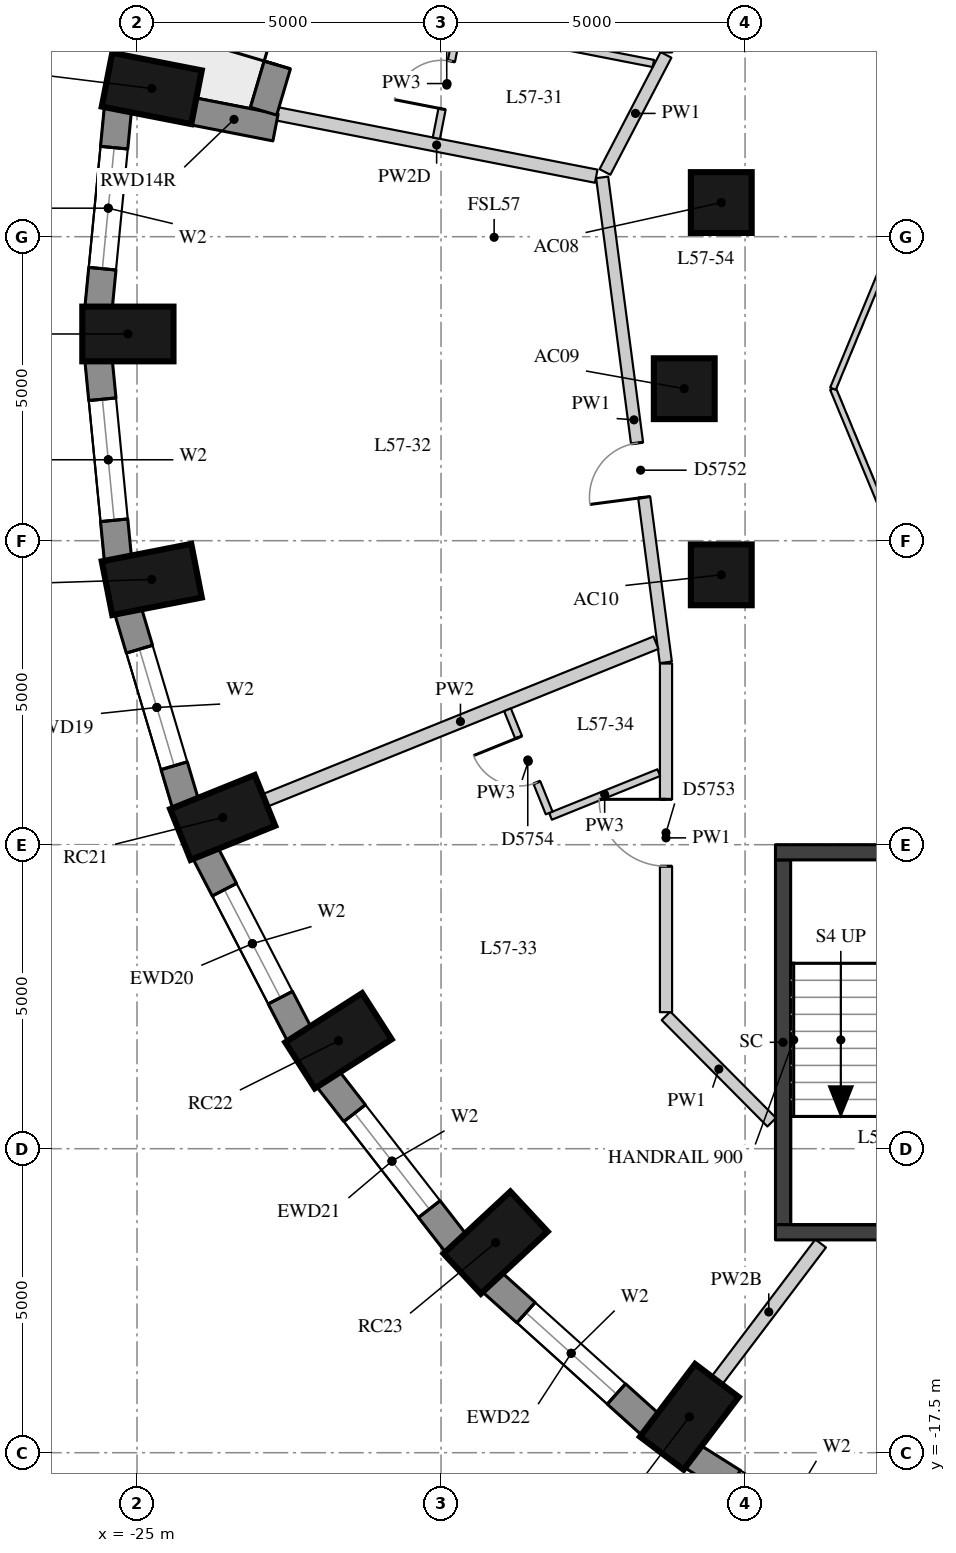
"""IFC4 building model, lengths in metres.
Left out: names, types, materials, properties, quantities, classifications, styles, units other than length and angle.
Written with IfcOpenShell. Run it as: python <this file> out.ifc"""

import sys

from ifc_helpers import new_model, si_unit, direction, frame, frame_2d, origin, origin_2d, place, context, subcontext, project, spatial, rectangle, extrude, element, fill, save


model = new_model("IFC4")
c1 = context("Model", 3, precision=1e-05, world=origin(), true_north=direction((0.0, 1.0)))
c2 = subcontext(c1, "Body", "Model", "MODEL_VIEW")
j1 = project(units=[si_unit("LENGTHUNIT", "METRE"), si_unit("PLANEANGLEUNIT", "RADIAN")], contexts=[c1])
p1 = place(None, origin())
s1 = spatial("IfcSite", under=j1, at=p1, CompositionType="ELEMENT")
p2 = place(p1, origin())
s2 = spatial("IfcBuilding", under=s1, at=p2, CompositionType="ELEMENT")
p3 = place(p2, frame((0.0, 0.0, 202.4)))
s3 = spatial("IfcBuildingStorey", under=s2, at=p3, CompositionType="ELEMENT", Elevation=202.4)
for number, where, z_axis, x_axis in (
    (1, (-24.757, 4.937, 0.0), (0.0, 0.0, 1.0), (-0.981, 0.192, 0.0)),
    (2, (-25.15, 0.9, 0.0), (0.0, 0.0, 1.0), (-1.0, 0.0, 0.0)),
    (3, (-24.757, -3.137, 0.0), (0.0, 0.0, 1.0), (-0.981, -0.192, 0.0)),
    (4, (-23.591, -7.052, 0.0), (0.0, 0.0, 1.0), (-0.927, -0.374, 0.0)),
    (5, (-21.687, -10.725, 0.0), (0.0, 0.0, 1.0), (-0.842, -0.539, 0.0)),
    (6, (-19.102, -14.045, 0.0), (0.0, 0.0, 1.0), (-0.732, -0.681, 0.0)),
    (7, (-15.916, -16.911, 0.0), (0.0, 0.0, 1.0), (-0.604, -0.797, 0.0)),
):
    element("IfcColumn", number, at=place(p3, frame(where, z_axis=z_axis, x_axis=x_axis)), inside=s3, PredefinedType="COLUMN", context=c2, shape_type="SweptSolid", body=[
        extrude(rectangle(XDim=1.5, YDim=0.9, at=origin_2d()), origin(), (0.0, 0.0, 1.0), 3.3),
    ])
for number, where, z_axis, x_axis in (
    (8, (-15.391, 3.062, 0.0), (0.0, 0.0, 1.0), (1.0, 0.0, 0.0)),
    (9, (-16.0, 0.0, 0.0), (0.0, 0.0, 1.0), (1.0, 0.0, 0.0)),
    (10, (-15.391, -3.062, 0.0), (0.0, 0.0, 1.0), (1.0, 0.0, 0.0)),
):
    element("IfcColumn", number, at=place(p3, frame(where, z_axis=z_axis, x_axis=x_axis)), inside=s3, PredefinedType="COLUMN", context=c2, shape_type="SweptSolid", body=[
        extrude(rectangle(XDim=1.0, YDim=1.0, at=origin_2d()), origin(), (0.0, 0.0, 1.0), 3.3),
    ])
p4 = place(p3, frame((-25.313, 4.608, 0.0), z_axis=(0.0, 0.0, 1.0), x_axis=(-0.096824116835, -0.995301507283, 0.0)))
e11 = element("IfcWall", 11, at=p4, inside=s3, PredefinedType="SOLIDWALL", context=c2, shape_type="SweptSolid", body=[
    extrude(rectangle(XDim=3.293, YDim=0.45, at=frame_2d((1.646, 0.0))), origin(), (0.0, 0.0, 1.0), 3.02),
])
p5 = place(p4, frame((0.646, 0.0, 0.4)))
e12 = element("IfcOpeningElement", 12, at=p5, cuts=e11, PredefinedType="OPENING", context=c2, shape_type="SweptSolid", body=[
    extrude(rectangle(XDim=2.0, YDim=1.75, at=frame_2d((1.0, 0.875))), frame((0.0, 0.235, 0.0), z_axis=(0.0, -1.0, 0.0), x_axis=(1.0, 0.0, 0.0)), (0.0, 0.0, 1.0), 0.47),
])
p6 = place(p3, frame((-25.632, 0.47, 0.0), z_axis=(0.0, 0.0, 1.0), x_axis=(0.096816972749, -0.995302202242, 0.0)))
e13 = element("IfcWall", 13, at=p6, inside=s3, PredefinedType="SOLIDWALL", context=c2, shape_type="SweptSolid", body=[
    extrude(rectangle(XDim=3.293, YDim=0.45, at=frame_2d((1.646, 0.0))), origin(), (0.0, 0.0, 1.0), 3.02),
])
p7 = place(p6, frame((0.646, 0.0, 0.4)))
e14 = element("IfcOpeningElement", 14, at=p7, cuts=e13, PredefinedType="OPENING", context=c2, shape_type="SweptSolid", body=[
    extrude(rectangle(XDim=2.0, YDim=1.75, at=frame_2d((1.0, 0.875))), frame((0.0, 0.235, 0.0), z_axis=(0.0, -1.0, 0.0), x_axis=(1.0, 0.0, 0.0)), (0.0, 0.0, 1.0), 0.47),
])
p8 = place(p3, frame((-25.148, -3.652, 0.0), z_axis=(0.0, 0.0, 1.0), x_axis=(0.285444972963, -0.958395099847, 0.0)))
e15 = element("IfcWall", 15, at=p8, inside=s3, PredefinedType="SOLIDWALL", context=c2, shape_type="SweptSolid", body=[
    extrude(rectangle(XDim=3.32, YDim=0.45, at=frame_2d((1.66, 0.0))), origin(), (0.0, 0.0, 1.0), 3.02),
])
p9 = place(p8, frame((0.66, 0.0, 0.4)))
e16 = element("IfcOpeningElement", 16, at=p9, cuts=e15, PredefinedType="OPENING", context=c2, shape_type="SweptSolid", body=[
    extrude(rectangle(XDim=2.0, YDim=1.75, at=frame_2d((1.0, 0.875))), frame((0.0, 0.235, 0.0), z_axis=(0.0, -1.0, 0.0), x_axis=(1.0, 0.0, 0.0)), (0.0, 0.0, 1.0), 0.47),
])
p10 = place(p3, frame((-23.878, -7.632, 0.0), z_axis=(0.0, 0.0, 1.0), x_axis=(0.460232593174, -0.887798378113, 0.0)))
e17 = element("IfcWall", 17, at=p10, inside=s3, PredefinedType="SOLIDWALL", context=c2, shape_type="SweptSolid", body=[
    extrude(rectangle(XDim=3.371, YDim=0.45, at=frame_2d((1.685, 0.0))), origin(), (0.0, 0.0, 1.0), 3.02),
])
p11 = place(p10, frame((0.685, 0.0, 0.4)))
e18 = element("IfcOpeningElement", 18, at=p11, cuts=e17, PredefinedType="OPENING", context=c2, shape_type="SweptSolid", body=[
    extrude(rectangle(XDim=2.0, YDim=1.75, at=frame_2d((1.0, 0.875))), frame((0.0, 0.235, 0.0), z_axis=(0.0, -1.0, 0.0), x_axis=(1.0, 0.0, 0.0)), (0.0, 0.0, 1.0), 0.47),
])
p12 = place(p3, frame((-21.863, -11.348, 0.0), z_axis=(0.0, 0.0, 1.0), x_axis=(0.614255239631, -0.789107407509, 0.0)))
e19 = element("IfcWall", 19, at=p12, inside=s3, PredefinedType="SOLIDWALL", context=c2, shape_type="SweptSolid", body=[
    extrude(rectangle(XDim=3.438, YDim=0.45, at=frame_2d((1.719, 0.0))), origin(), (0.0, 0.0, 1.0), 3.02),
])
p13 = place(p12, frame((0.719, 0.0, 0.4)))
e20 = element("IfcOpeningElement", 20, at=p13, cuts=e19, PredefinedType="OPENING", context=c2, shape_type="SweptSolid", body=[
    extrude(rectangle(XDim=2.0, YDim=1.75, at=frame_2d((1.0, 0.875))), frame((0.0, 0.235, 0.0), z_axis=(0.0, -1.0, 0.0), x_axis=(1.0, 0.0, 0.0)), (0.0, 0.0, 1.0), 0.47),
])
p14 = place(p3, frame((-19.165, -14.69, 0.0), z_axis=(0.0, 0.0, 1.0), x_axis=(0.743442727602, -0.668799604348, 0.0)))
e21 = element("IfcWall", 21, at=p14, inside=s3, PredefinedType="SOLIDWALL", context=c2, shape_type="SweptSolid", body=[
    extrude(rectangle(XDim=3.513, YDim=0.45, at=frame_2d((1.756, 0.0))), origin(), (0.0, 0.0, 1.0), 3.02),
])
p15 = place(p14, frame((0.756, 0.0, 0.4)))
e22 = element("IfcOpeningElement", 22, at=p15, cuts=e21, PredefinedType="OPENING", context=c2, shape_type="SweptSolid", body=[
    extrude(rectangle(XDim=2.0, YDim=1.75, at=frame_2d((1.0, 0.875))), frame((0.0, 0.235, 0.0), z_axis=(0.0, -1.0, 0.0), x_axis=(1.0, 0.0, 0.0)), (0.0, 0.0, 1.0), 0.47),
])
p16 = place(p3, frame((-15.867, -17.559, 0.0), z_axis=(0.0, 0.0, 1.0), x_axis=(0.84616917791, -0.532914366813, 0.0)))
e23 = element("IfcWall", 23, at=p16, inside=s3, PredefinedType="SOLIDWALL", context=c2, shape_type="SweptSolid", body=[
    extrude(rectangle(XDim=3.587, YDim=0.45, at=frame_2d((1.793, 0.0))), origin(), (0.0, 0.0, 1.0), 3.02),
])
p17 = place(p16, frame((0.793, 0.0, 0.4)))
e24 = element("IfcOpeningElement", 24, at=p17, cuts=e23, PredefinedType="OPENING", context=c2, shape_type="SweptSolid", body=[
    extrude(rectangle(XDim=2.0, YDim=1.75, at=frame_2d((1.0, 0.875))), frame((0.0, 0.235, 0.0), z_axis=(0.0, -1.0, 0.0), x_axis=(1.0, 0.0, 0.0)), (0.0, 0.0, 1.0), 0.47),
])
p18 = place(p3, frame((-24.087, 4.563, 0.0), z_axis=(0.0, 0.0, 1.0), x_axis=(0.98143579878, -0.191790961394, 0.0)))
e25 = element("IfcWall", 25, at=p18, inside=s3, PredefinedType="SOLIDWALL", context=c2, shape_type="SweptSolid", body=[
    extrude(rectangle(XDim=1.39, YDim=0.45, at=frame_2d((0.695, 0.0))), origin(), (0.0, 0.0, 1.0), 2.47),
])
p19 = place(p3, frame((-21.854, 8.146, 0.0), z_axis=(0.0, 0.0, 1.0), x_axis=(-0.284757753004, -0.958599510799, 0.0)))
e26 = element("IfcWall", 26, at=p19, inside=s3, PredefinedType="SOLIDWALL", context=c2, shape_type="SweptSolid", body=[
    extrude(rectangle(XDim=3.737, YDim=0.45, at=frame_2d((1.869, 0.0))), origin(), (0.0, 0.0, 1.0), 3.02),
])
p20 = place(p19, frame((0.794, 0.0, 0.4)))
e27 = element("IfcOpeningElement", 27, at=p20, cuts=e26, PredefinedType="OPENING", context=c2, shape_type="SweptSolid", body=[
    extrude(rectangle(XDim=1.0, YDim=1.75, at=frame_2d((0.5, 0.875))), frame((0.0, 0.235, 0.0), z_axis=(0.0, -1.0, 0.0), x_axis=(1.0, 0.0, 0.0)), (0.0, 0.0, 1.0), 0.47),
])
p21 = place(p19, frame((1.944, 0.0, 0.0)))
e28 = element("IfcOpeningElement", 28, at=p21, cuts=e26, PredefinedType="OPENING", context=c2, shape_type="SweptSolid", body=[
    extrude(rectangle(XDim=1.0, YDim=2.15, at=frame_2d((0.5, 1.075))), frame((0.0, 0.235, 0.0), z_axis=(0.0, -1.0, 0.0), x_axis=(1.0, 0.0, 0.0)), (0.0, 0.0, 1.0), 0.47),
])
p22 = place(p3, frame((-14.375, -13.75, -0.28), z_axis=(0.0, 0.0, 1.0), x_axis=(0.0, 1.0, 0.0)))
e29 = element("IfcWall", 29, at=p22, inside=s3, PredefinedType="SHEAR", context=c2, shape_type="SweptSolid", body=[
    extrude(rectangle(XDim=6.0, YDim=0.25, at=frame_2d((3.0, 0.0))), origin(), (0.0, 0.0, 1.0), 3.3),
])
for number, where, z_axis, x_axis in (
    (30, (-14.5, -7.625, -0.28), (0.0, 0.0, 1.0), (1.0, 0.0, 0.0)),
    (31, (-14.5, -13.875, -0.28), (0.0, 0.0, 1.0), (1.0, 0.0, 0.0)),
):
    element("IfcWall", number, at=place(p3, frame(where, z_axis=z_axis, x_axis=x_axis)), inside=s3, PredefinedType="SHEAR", context=c2, shape_type="SweptSolid", body=[
        extrude(rectangle(XDim=5.2, YDim=0.25, at=frame_2d((2.6, 0.0))), origin(), (0.0, 0.0, 1.0), 3.3),
    ])
p23 = place(p3, frame((-14.562, -12.064, 0.0), z_axis=(0.0, 0.0, 1.0), x_axis=(-0.704826289083, 0.709379942074, 0.0)))
e32 = element("IfcWall", 32, at=p23, inside=s3, PredefinedType="PARTITIONING", context=c2, shape_type="SweptSolid", body=[
    extrude(rectangle(XDim=2.466, YDim=0.2, at=frame_2d((1.233, 0.0))), origin(), (0.0, 0.0, 1.0), 3.02),
])
p24 = place(p3, frame((-16.3, -10.255, 0.0), z_axis=(0.0, 0.0, 1.0), x_axis=(0.0, 1.0, 0.0)))
e33 = element("IfcWall", 33, at=p24, inside=s3, PredefinedType="PARTITIONING", context=c2, shape_type="SweptSolid", body=[
    extrude(rectangle(XDim=5.734, YDim=0.2, at=frame_2d((2.867, 0.0))), origin(), (0.0, 0.0, 1.0), 3.02),
])
p25 = place(p24, frame((2.401, 0.0, 0.0)))
e34 = element("IfcOpeningElement", 34, at=p25, cuts=e33, PredefinedType="OPENING", context=c2, shape_type="SweptSolid", body=[
    extrude(rectangle(XDim=1.1, YDim=2.1, at=frame_2d((0.55, 1.05))), frame((0.0, 0.11, 0.0), z_axis=(0.0, -1.0, 0.0), x_axis=(1.0, 0.0, 0.0)), (0.0, 0.0, 1.0), 0.22),
])
p26 = place(p3, frame((-16.303, -4.501, 0.0), z_axis=(0.0, 0.0, 1.0), x_axis=(-0.130191522351, 0.991488864036, 0.0)))
e35 = element("IfcWall", 35, at=p26, inside=s3, PredefinedType="PARTITIONING", context=c2, shape_type="SweptSolid", body=[
    extrude(rectangle(XDim=8.045, YDim=0.2, at=frame_2d((4.022, 0.0))), origin(), (0.0, 0.0, 1.0), 3.02),
])
p27 = place(p26, frame((2.738, 0.0, 0.0)))
e36 = element("IfcOpeningElement", 36, at=p27, cuts=e35, PredefinedType="OPENING", context=c2, shape_type="SweptSolid", body=[
    extrude(rectangle(XDim=0.9, YDim=2.1, at=frame_2d((0.45, 1.05))), frame((0.0, 0.11, 0.0), z_axis=(0.0, -1.0, 0.0), x_axis=(1.0, 0.0, 0.0)), (0.0, 0.0, 1.0), 0.22),
])
p28 = place(p3, frame((-17.304, 3.565, 0.0), z_axis=(0.0, 0.0, 1.0), x_axis=(0.46212415324, 0.886815238363, 0.0)))
e37 = element("IfcWall", 37, at=p28, inside=s3, PredefinedType="PARTITIONING", context=c2, shape_type="SweptSolid", body=[
    extrude(rectangle(XDim=2.172, YDim=0.2, at=frame_2d((1.086, 0.0))), origin(), (0.0, 0.0, 1.0), 3.02),
])
p29 = place(p3, frame((-16.3, 5.531, 0.0), z_axis=(0.0, 0.0, 1.0), x_axis=(0.0, 1.0, 0.0)))
e38 = element("IfcWall", 38, at=p29, inside=s3, PredefinedType="PARTITIONING", context=c2, shape_type="SweptSolid", body=[
    extrude(rectangle(XDim=2.409, YDim=0.2, at=frame_2d((1.205, 0.0))), origin(), (0.0, 0.0, 1.0), 3.02),
])
p30 = place(p29, frame((0.14, 0.0, 0.0)))
e39 = element("IfcOpeningElement", 39, at=p30, cuts=e38, PredefinedType="OPENING", context=c2, shape_type="SweptSolid", body=[
    extrude(rectangle(XDim=1.1, YDim=2.1, at=frame_2d((0.55, 1.05))), frame((0.0, 0.11, 0.0), z_axis=(0.0, -1.0, 0.0), x_axis=(1.0, 0.0, 0.0)), (0.0, 0.0, 1.0), 0.22),
])
p31 = place(p3, frame((-22.697, 4.521, 0.0), z_axis=(0.0, 0.0, 1.0), x_axis=(0.981448712972, -0.19172486486, 0.0)))
e40 = element("IfcWall", 40, at=p31, inside=s3, PredefinedType="PARTITIONING", context=c2, shape_type="SweptSolid", body=[
    extrude(rectangle(XDim=5.348, YDim=0.22, at=frame_2d((2.674, 0.0))), origin(), (0.0, 0.0, 1.0), 2.47),
])
p32 = place(p3, frame((-22.896, -6.771, 0.0), z_axis=(0.0, 0.0, 1.0), x_axis=(0.927377440276, 0.374127095073, 0.0)))
e41 = element("IfcWall", 41, at=p32, inside=s3, PredefinedType="PARTITIONING", context=c2, shape_type="SweptSolid", body=[
    extrude(rectangle(XDim=6.933, YDim=0.22, at=frame_2d((3.467, 0.0))), origin(), (0.0, 0.0, 1.0), 3.02),
])
p33 = place(p3, frame((-15.463, -16.312, 0.0), z_axis=(0.0, 0.0, 1.0), x_axis=(0.603613294085, 0.797277236101, 0.0)))
e42 = element("IfcWall", 42, at=p33, inside=s3, PredefinedType="PARTITIONING", context=c2, shape_type="SweptSolid", body=[
    extrude(rectangle(XDim=2.828, YDim=0.22, at=frame_2d((1.414, 0.0))), origin(), (0.0, 0.0, 1.0), 2.57),
])
p34 = place(p3, frame((-16.508, 5.349, 0.0), z_axis=(0.0, 0.0, 1.0), x_axis=(-0.981441910277, 0.191759684898, 0.0)))
e43 = element("IfcWall", 43, at=p34, inside=s3, PredefinedType="PARTITIONING", context=c2, shape_type="SweptSolid", body=[
    extrude(rectangle(XDim=3.267, YDim=0.12, at=frame_2d((1.633, 0.0))), origin(), (0.0, 0.0, 1.0), 3.02),
])
p35 = place(p3, frame((-16.419, -6.315, 0.0), z_axis=(0.0, 0.0, 1.0), x_axis=(-0.927358946461, -0.374172933841, 0.0)))
e44 = element("IfcWall", 44, at=p35, inside=s3, PredefinedType="PARTITIONING", context=c2, shape_type="SweptSolid", body=[
    extrude(rectangle(XDim=1.92, YDim=0.12, at=frame_2d((0.96, 0.0))), origin(), (0.0, 0.0, 1.0), 3.02),
])
p36 = place(p3, frame((-19.726, 5.917, 0.0), z_axis=(0.0, 0.0, 1.0), x_axis=(-0.191830051998, -0.981428158935, 0.0)))
e45 = element("IfcWall", 45, at=p36, inside=s3, PredefinedType="PARTITIONING", context=c2, shape_type="SweptSolid", body=[
    extrude(rectangle(XDim=1.83, YDim=0.12, at=frame_2d((0.915, 0.0))), origin(), (0.0, 0.0, 1.0), 3.02),
])
p37 = place(p36, frame((0.54, 0.0, 0.0)))
e46 = element("IfcOpeningElement", 46, at=p37, cuts=e45, PredefinedType="OPENING", context=c2, shape_type="SweptSolid", body=[
    extrude(rectangle(XDim=0.8, YDim=2.1, at=frame_2d((0.4, 1.05))), frame((0.0, 0.07, 0.0), z_axis=(0.0, -1.0, 0.0), x_axis=(1.0, 0.0, 0.0)), (0.0, 0.0, 1.0), 0.14),
])
p38 = place(p3, frame((-18.222, -6.978, 0.0), z_axis=(0.0, 0.0, 1.0), x_axis=(-0.374218187905, 0.927340685963, 0.0)))
e47 = element("IfcWall", 47, at=p38, inside=s3, PredefinedType="PARTITIONING", context=c2, shape_type="SweptSolid", body=[
    extrude(rectangle(XDim=1.83, YDim=0.12, at=frame_2d((0.915, 0.0))), origin(), (0.0, 0.0, 1.0), 3.02),
])
p39 = place(p38, frame((0.54, 0.0, 0.0)))
e48 = element("IfcOpeningElement", 48, at=p39, cuts=e47, PredefinedType="OPENING", context=c2, shape_type="SweptSolid", body=[
    extrude(rectangle(XDim=0.8, YDim=2.1, at=frame_2d((0.4, 1.05))), frame((0.0, 0.07, 0.0), z_axis=(0.0, -1.0, 0.0), x_axis=(1.0, 0.0, 0.0)), (0.0, 0.0, 1.0), 0.14),
])
for number, where, z_axis, x_axis in (
    (49, (-11.927, -3.927, 0.0), (0.0, 0.0, 1.0), (-0.383, 0.924, 0.0)),
    (50, (-13.554, 0.0, 0.0), (0.0, 0.0, 1.0), (0.383, 0.924, 0.0)),
):
    element("IfcWall", number, at=place(p3, frame(where, z_axis=z_axis, x_axis=x_axis)), inside=s3, PredefinedType="PARTITIONING", context=c2, shape_type="SweptSolid", body=[
        extrude(rectangle(XDim=4.251, YDim=0.1, at=frame_2d((2.125, 0.0))), origin(), (0.0, 0.0, 1.0), 3.02),
    ])
p40 = place(p5, origin())
e51 = element("IfcWindow", 51, at=p40, inside=s3, PartitioningType="SINGLE_PANEL", PredefinedType="WINDOW", context=c2, shape_type="SweptSolid", body=[
    extrude(rectangle(XDim=2.0, YDim=1.75, at=frame_2d((1.0, 0.875))), frame((0.0, 0.035, 0.0), z_axis=(0.0, -1.0, 0.0), x_axis=(1.0, 0.0, 0.0)), (0.0, 0.0, 1.0), 0.06),
])
fill(e12, e51)
p41 = place(p7, origin())
e52 = element("IfcWindow", 52, at=p41, inside=s3, PartitioningType="SINGLE_PANEL", PredefinedType="WINDOW", context=c2, shape_type="SweptSolid", body=[
    extrude(rectangle(XDim=2.0, YDim=1.75, at=frame_2d((1.0, 0.875))), frame((0.0, 0.035, 0.0), z_axis=(0.0, -1.0, 0.0), x_axis=(1.0, 0.0, 0.0)), (0.0, 0.0, 1.0), 0.06),
])
fill(e14, e52)
p42 = place(p9, origin())
e53 = element("IfcWindow", 53, at=p42, inside=s3, PartitioningType="SINGLE_PANEL", PredefinedType="WINDOW", context=c2, shape_type="SweptSolid", body=[
    extrude(rectangle(XDim=2.0, YDim=1.75, at=frame_2d((1.0, 0.875))), frame((0.0, 0.035, 0.0), z_axis=(0.0, -1.0, 0.0), x_axis=(1.0, 0.0, 0.0)), (0.0, 0.0, 1.0), 0.06),
])
fill(e16, e53)
p43 = place(p11, origin())
e54 = element("IfcWindow", 54, at=p43, inside=s3, PartitioningType="SINGLE_PANEL", PredefinedType="WINDOW", context=c2, shape_type="SweptSolid", body=[
    extrude(rectangle(XDim=2.0, YDim=1.75, at=frame_2d((1.0, 0.875))), frame((0.0, 0.035, 0.0), z_axis=(0.0, -1.0, 0.0), x_axis=(1.0, 0.0, 0.0)), (0.0, 0.0, 1.0), 0.06),
])
fill(e18, e54)
p44 = place(p13, origin())
e55 = element("IfcWindow", 55, at=p44, inside=s3, PartitioningType="SINGLE_PANEL", PredefinedType="WINDOW", context=c2, shape_type="SweptSolid", body=[
    extrude(rectangle(XDim=2.0, YDim=1.75, at=frame_2d((1.0, 0.875))), frame((0.0, 0.035, 0.0), z_axis=(0.0, -1.0, 0.0), x_axis=(1.0, 0.0, 0.0)), (0.0, 0.0, 1.0), 0.06),
])
fill(e20, e55)
p45 = place(p15, origin())
e56 = element("IfcWindow", 56, at=p45, inside=s3, PartitioningType="SINGLE_PANEL", PredefinedType="WINDOW", context=c2, shape_type="SweptSolid", body=[
    extrude(rectangle(XDim=2.0, YDim=1.75, at=frame_2d((1.0, 0.875))), frame((0.0, 0.035, 0.0), z_axis=(0.0, -1.0, 0.0), x_axis=(1.0, 0.0, 0.0)), (0.0, 0.0, 1.0), 0.06),
])
fill(e22, e56)
p46 = place(p21, frame((1.0, 0.0, 0.0), z_axis=(0.0, 0.0, 1.0), x_axis=(-1.0, 0.0, 0.0)))
e57 = element("IfcDoor", 57, at=p46, inside=s3, OperationType="SINGLE_SWING_LEFT", PredefinedType="DOOR", context=c2, shape_type="SweptSolid", body=[
    extrude(rectangle(XDim=1.0, YDim=2.15, at=frame_2d((0.5, 1.075))), frame((0.0, 0.075, 0.0), z_axis=(0.0, -1.0, 0.0), x_axis=(1.0, 0.0, 0.0)), (0.0, 0.0, 1.0), 0.05),
])
fill(e28, e57)
p47 = place(p37, origin())
e58 = element("IfcDoor", 58, at=p47, inside=s3, OperationType="SINGLE_SWING_LEFT", PredefinedType="DOOR", context=c2, shape_type="SweptSolid", body=[
    extrude(rectangle(XDim=0.8, YDim=2.1, at=frame_2d((0.4, 1.05))), frame((0.0, 0.025, 0.0), z_axis=(0.0, -1.0, 0.0), x_axis=(1.0, 0.0, 0.0)), (0.0, 0.0, 1.0), 0.05),
])
fill(e46, e58)
p48 = place(p27, origin())
e59 = element("IfcDoor", 59, at=p48, inside=s3, OperationType="SINGLE_SWING_LEFT", PredefinedType="DOOR", context=c2, shape_type="SweptSolid", body=[
    extrude(rectangle(XDim=0.9, YDim=2.1, at=frame_2d((0.45, 1.05))), frame((0.0, 0.025, 0.0), z_axis=(0.0, -1.0, 0.0), x_axis=(1.0, 0.0, 0.0)), (0.0, 0.0, 1.0), 0.05),
])
fill(e36, e59)
p49 = place(p25, origin())
e60 = element("IfcDoor", 60, at=p49, inside=s3, OperationType="SINGLE_SWING_RIGHT", PredefinedType="DOOR", context=c2, shape_type="SweptSolid", body=[
    extrude(rectangle(XDim=1.1, YDim=2.1, at=frame_2d((0.55, 1.05))), frame((0.0, 0.025, 0.0), z_axis=(0.0, -1.0, 0.0), x_axis=(1.0, 0.0, 0.0)), (0.0, 0.0, 1.0), 0.05),
])
fill(e34, e60)
p50 = place(p39, origin())
e61 = element("IfcDoor", 61, at=p50, inside=s3, OperationType="SINGLE_SWING_RIGHT", PredefinedType="DOOR", context=c2, shape_type="SweptSolid", body=[
    extrude(rectangle(XDim=0.8, YDim=2.1, at=frame_2d((0.4, 1.05))), frame((0.0, 0.025, 0.0), z_axis=(0.0, -1.0, 0.0), x_axis=(1.0, 0.0, 0.0)), (0.0, 0.0, 1.0), 0.05),
])
fill(e48, e61)
save(model, sys.argv[1])
